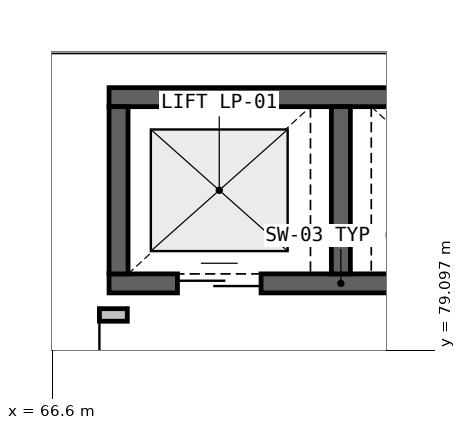
"""IFC4 building model, lengths in metres.
Left out: names, types, materials, properties, quantities, classifications, styles, units other than length and angle.
Written with IfcOpenShell. Run it as: python <this file> out.ifc"""

import sys

from ifc_helpers import new_model, si_unit, direction, frame, frame_2d, origin, place, context, subcontext, project, spatial, rectangle, extrude, element, fill, save


model = new_model("IFC4")
c1 = context("Model", 3, precision=1e-05, world=origin(), true_north=direction((0.0, 1.0)))
c2 = subcontext(c1, "Body", "Model", "MODEL_VIEW")
j1 = project(units=[si_unit("LENGTHUNIT", "METRE"), si_unit("PLANEANGLEUNIT", "RADIAN")], contexts=[c1])
p1 = place(None, origin())
s1 = spatial("IfcSite", under=j1, at=p1, CompositionType="ELEMENT")
p2 = place(p1, origin())
s2 = spatial("IfcBuilding", under=s1, at=p2, CompositionType="ELEMENT")
p3 = place(p2, frame((0.0, 0.0, 5.4)))
s3 = spatial("IfcBuildingStorey", under=s2, at=p3, CompositionType="ELEMENT", Elevation=5.4)
p4 = place(p3, frame((67.35, 79.975, 0.0), z_axis=(0.0, 0.0, 1.0), x_axis=(1.0, 0.0, 0.0)))
e1 = element("IfcWall", 1, at=p4, inside=s3, PredefinedType="SHEAR", context=c2, shape_type="SweptSolid", body=[
    extrude(rectangle(XDim=6.1, YDim=0.25, at=frame_2d((3.05, 0.0))), origin(), (0.0, 0.0, 1.0), 4.445),
])
p5 = place(p4, frame((0.9, 0.0, 0.0)))
e2 = element("IfcOpeningElement", 2, at=p5, cuts=e1, PredefinedType="OPENING", context=c2, shape_type="SweptSolid", body=[
    extrude(rectangle(XDim=1.1, YDim=2.15, at=frame_2d((0.55, 1.075))), frame((0.0, 0.135, 0.0), z_axis=(0.0, -1.0, 0.0), x_axis=(1.0, 0.0, 0.0)), (0.0, 0.0, 1.0), 0.27),
])
p6 = place(p4, frame((4.1, 0.0, 0.0)))
e3 = element("IfcOpeningElement", 3, at=p6, cuts=e1, PredefinedType="OPENING", context=c2, shape_type="SweptSolid", body=[
    extrude(rectangle(XDim=1.1, YDim=2.15, at=frame_2d((0.55, 1.075))), frame((0.0, 0.135, 0.0), z_axis=(0.0, -1.0, 0.0), x_axis=(1.0, 0.0, 0.0)), (0.0, 0.0, 1.0), 0.27),
])
p7 = place(p3, frame((73.45, 82.425, 0.0), z_axis=(0.0, 0.0, 1.0), x_axis=(-1.0, 0.0, 0.0)))
e4 = element("IfcWall", 4, at=p7, inside=s3, PredefinedType="SHEAR", context=c2, shape_type="SweptSolid", body=[
    extrude(rectangle(XDim=6.1, YDim=0.25, at=frame_2d((3.05, 0.0))), origin(), (0.0, 0.0, 1.0), 4.445),
])
for number, where, z_axis, x_axis in (
    (5, (67.475, 82.3, 0.0), (0.0, 0.0, 1.0), (0.0, -1.0, 0.0)),
    (6, (70.4, 80.1, 0.0), (0.0, 0.0, 1.0), (0.0, 1.0, 0.0)),
):
    element("IfcWall", number, at=place(p3, frame(where, z_axis=z_axis, x_axis=x_axis)), inside=s3, PredefinedType="SHEAR", context=c2, shape_type="SweptSolid", body=[
        extrude(rectangle(XDim=2.2, YDim=0.25, at=frame_2d((1.1, 0.0))), origin(), (0.0, 0.0, 1.0), 4.445),
    ])
p8 = place(p3, frame((67.59, 79.56, 0.0), z_axis=(0.0, 0.0, 1.0), x_axis=(-1.0, 0.0, 0.0)))
e7 = element("IfcWall", 7, at=p8, inside=s3, PredefinedType="PARTITIONING", context=c2, shape_type="SweptSolid", body=[
    extrude(rectangle(XDim=1.683, YDim=0.165, at=frame_2d((0.842, 0.0))), origin(), (0.0, 0.0, 1.0), 4.445),
])
p9 = place(p8, frame((0.367, 0.0, 0.0)))
e8 = element("IfcOpeningElement", 8, at=p9, cuts=e7, PredefinedType="OPENING", context=c2, shape_type="SweptSolid", body=[
    extrude(rectangle(XDim=0.95, YDim=2.1, at=frame_2d((0.475, 1.05))), frame((0.0, 0.093, 0.0), z_axis=(0.0, -1.0, 0.0), x_axis=(1.0, 0.0, 0.0)), (0.0, 0.0, 1.0), 0.185),
])
p10 = place(p5, origin())
e9 = element("IfcDoor", 9, at=p10, inside=s3, OperationType="DOUBLE_DOOR_SLIDING", PredefinedType="DOOR", context=c2, shape_type="SweptSolid", body=[
    extrude(rectangle(XDim=1.1, YDim=2.15, at=frame_2d((0.55, 1.075))), frame((0.0, 0.025, 0.0), z_axis=(0.0, -1.0, 0.0), x_axis=(1.0, 0.0, 0.0)), (0.0, 0.0, 1.0), 0.05),
])
fill(e2, e9)
p11 = place(p9, origin())
e10 = element("IfcDoor", 10, at=p11, inside=s3, OperationType="SINGLE_SWING_RIGHT", PredefinedType="DOOR", context=c2, shape_type="SweptSolid", body=[
    extrude(rectangle(XDim=0.95, YDim=2.1, at=frame_2d((0.475, 1.05))), frame((0.0, 0.025, 0.0), z_axis=(0.0, -1.0, 0.0), x_axis=(1.0, 0.0, 0.0)), (0.0, 0.0, 1.0), 0.05),
])
fill(e8, e10)
save(model, sys.argv[1])
